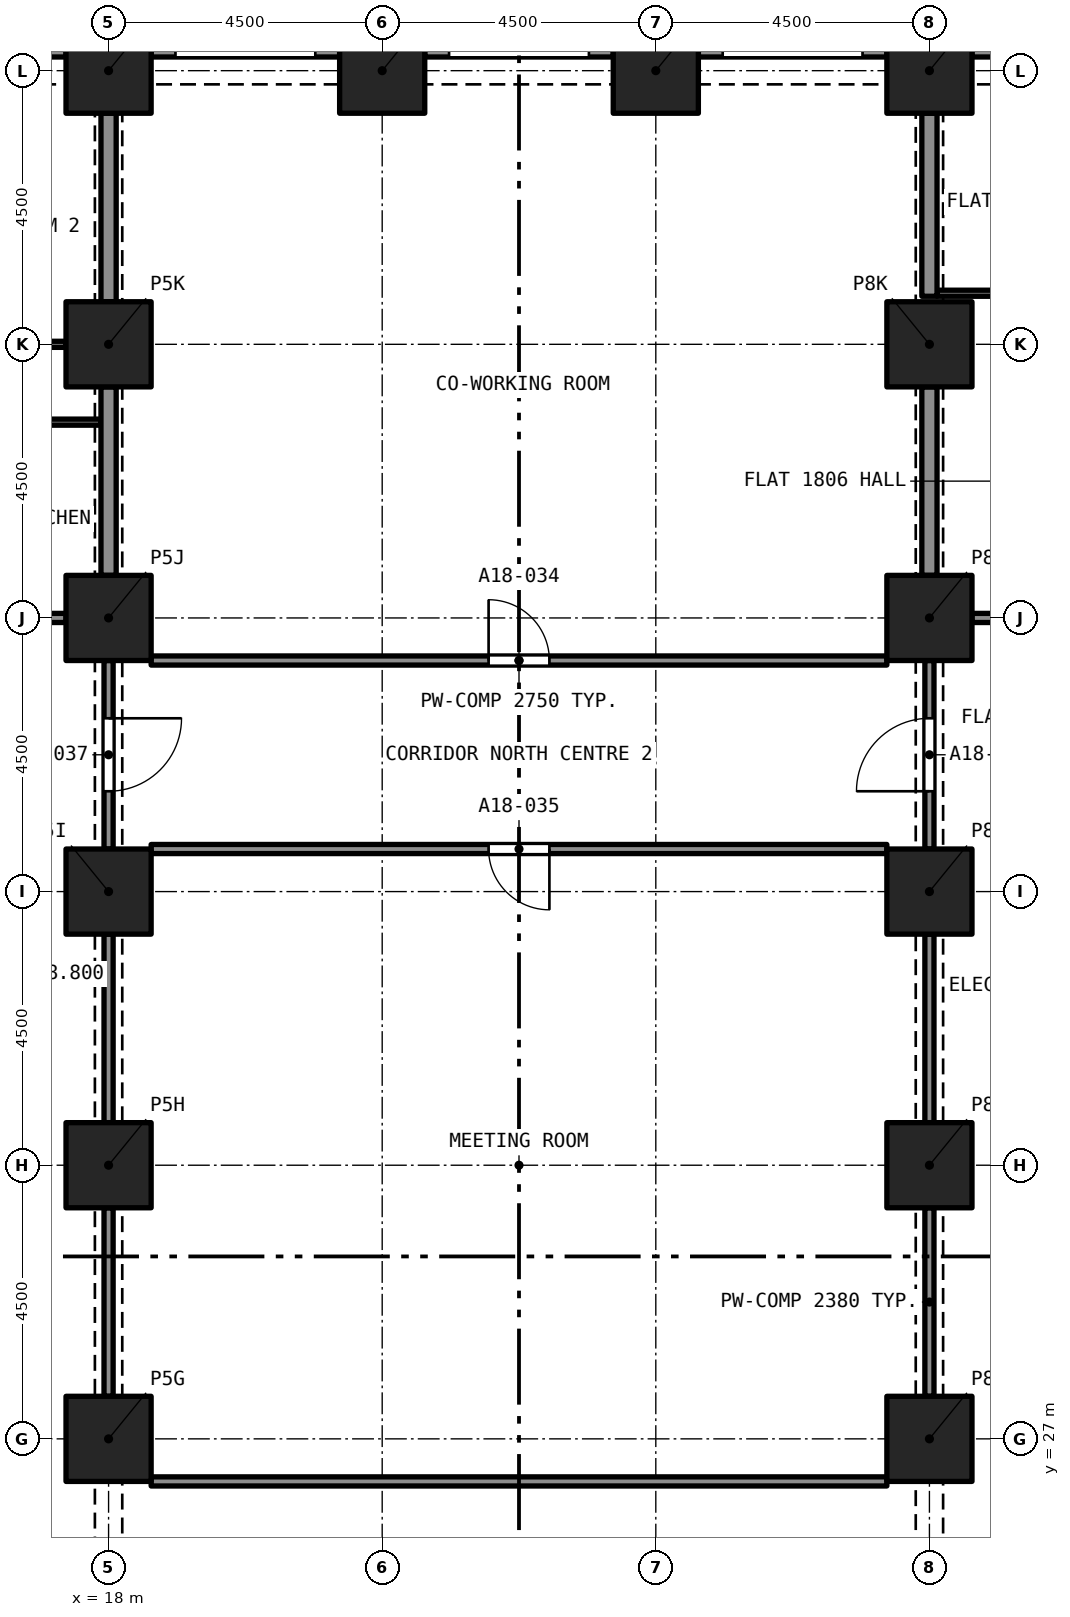
"""IFC4 building model, lengths in metres.
Left out: names, types, materials, properties, quantities, classifications, styles, units other than length and angle.
Written with IfcOpenShell. Run it as: python <this file> out.ifc"""

import sys

from ifc_helpers import new_model, si_unit, direction, frame, frame_2d, origin, origin_2d, place, context, subcontext, project, spatial, rectangle, extrude, element, fill, save


model = new_model("IFC4")
c1 = context("Model", 3, precision=1e-05, world=origin(), true_north=direction((0.0, 1.0)))
c2 = subcontext(c1, "Body", "Model", "MODEL_VIEW")
j1 = project(units=[si_unit("LENGTHUNIT", "METRE"), si_unit("PLANEANGLEUNIT", "RADIAN")], contexts=[c1])
p1 = place(None, origin())
s1 = spatial("IfcSite", under=j1, at=p1, CompositionType="ELEMENT")
p2 = place(p1, origin())
s2 = spatial("IfcBuilding", under=s1, at=p2, CompositionType="ELEMENT")
p3 = place(p2, frame((0.0, 0.0, 68.8)))
s3 = spatial("IfcBuildingStorey", under=s2, at=p3, CompositionType="ELEMENT", Elevation=68.8)
for number, where, z_axis, x_axis in (
    (1, (18.0, 27.0, 0.0), (0.0, 0.0, 1.0), (1.0, 0.0, 0.0)),
    (2, (31.5, 27.0, 0.0), (0.0, 0.0, 1.0), (1.0, 0.0, 0.0)),
    (3, (18.0, 31.5, 0.0), (0.0, 0.0, 1.0), (1.0, 0.0, 0.0)),
    (4, (31.5, 31.5, 0.0), (0.0, 0.0, 1.0), (1.0, 0.0, 0.0)),
    (5, (18.0, 36.0, 0.0), (0.0, 0.0, 1.0), (1.0, 0.0, 0.0)),
    (6, (31.5, 36.0, 0.0), (0.0, 0.0, 1.0), (1.0, 0.0, 0.0)),
    (7, (18.0, 40.5, 0.0), (0.0, 0.0, 1.0), (1.0, 0.0, 0.0)),
    (8, (31.5, 40.5, 0.0), (0.0, 0.0, 1.0), (1.0, 0.0, 0.0)),
    (9, (18.0, 45.0, 0.0), (0.0, 0.0, 1.0), (1.0, 0.0, 0.0)),
    (10, (31.5, 45.0, 0.0), (0.0, 0.0, 1.0), (1.0, 0.0, 0.0)),
    (11, (18.0, 49.5, 0.0), (0.0, 0.0, 1.0), (1.0, 0.0, 0.0)),
    (12, (22.5, 49.5, 0.0), (0.0, 0.0, 1.0), (1.0, 0.0, 0.0)),
    (13, (27.0, 49.5, 0.0), (0.0, 0.0, 1.0), (1.0, 0.0, 0.0)),
    (14, (31.5, 49.5, 0.0), (0.0, 0.0, 1.0), (1.0, 0.0, 0.0)),
):
    element("IfcColumn", number, at=place(p3, frame(where, z_axis=z_axis, x_axis=x_axis)), inside=s3, PredefinedType="COLUMN", context=c2, shape_type="SweptSolid", body=[
        extrude(rectangle(XDim=1.4, YDim=1.4, at=origin_2d()), origin(), (0.0, 0.0, 1.0), 3.2),
    ])
p4 = place(p3, frame((32.2, 49.875, 0.0), z_axis=(0.0, 0.0, 1.0), x_axis=(1.0, 0.0, 0.0)))
e15 = element("IfcWall", 15, at=p4, inside=s3, PredefinedType="SOLIDWALL", context=c2, shape_type="SweptSolid", body=[
    extrude(rectangle(XDim=3.1, YDim=0.3, at=frame_2d((1.55, 0.0))), origin(), (0.0, 0.0, 1.0), 3.2),
])
p5 = place(p4, frame((0.4, 0.0, 0.45)))
e16 = element("IfcOpeningElement", 16, at=p5, cuts=e15, PredefinedType="OPENING", context=c2, shape_type="SweptSolid", body=[
    extrude(rectangle(XDim=2.3, YDim=1.95, at=frame_2d((1.15, 0.975))), frame((0.0, 0.16, 0.0), z_axis=(0.0, -1.0, 0.0), x_axis=(1.0, 0.0, 0.0)), (0.0, 0.0, 1.0), 0.32),
])
p6 = place(p3, frame((27.7, 49.875, 0.0), z_axis=(0.0, 0.0, 1.0), x_axis=(1.0, 0.0, 0.0)))
e17 = element("IfcWall", 17, at=p6, inside=s3, PredefinedType="SOLIDWALL", context=c2, shape_type="SweptSolid", body=[
    extrude(rectangle(XDim=3.1, YDim=0.3, at=frame_2d((1.55, 0.0))), origin(), (0.0, 0.0, 1.0), 3.2),
])
p7 = place(p6, frame((0.4, 0.0, 0.45)))
e18 = element("IfcOpeningElement", 18, at=p7, cuts=e17, PredefinedType="OPENING", context=c2, shape_type="SweptSolid", body=[
    extrude(rectangle(XDim=2.3, YDim=1.95, at=frame_2d((1.15, 0.975))), frame((0.0, 0.16, 0.0), z_axis=(0.0, -1.0, 0.0), x_axis=(1.0, 0.0, 0.0)), (0.0, 0.0, 1.0), 0.32),
])
p8 = place(p3, frame((23.2, 49.875, 0.0), z_axis=(0.0, 0.0, 1.0), x_axis=(1.0, 0.0, 0.0)))
e19 = element("IfcWall", 19, at=p8, inside=s3, PredefinedType="SOLIDWALL", context=c2, shape_type="SweptSolid", body=[
    extrude(rectangle(XDim=3.1, YDim=0.3, at=frame_2d((1.55, 0.0))), origin(), (0.0, 0.0, 1.0), 3.2),
])
p9 = place(p8, frame((0.4, 0.0, 0.45)))
e20 = element("IfcOpeningElement", 20, at=p9, cuts=e19, PredefinedType="OPENING", context=c2, shape_type="SweptSolid", body=[
    extrude(rectangle(XDim=2.3, YDim=1.95, at=frame_2d((1.15, 0.975))), frame((0.0, 0.16, 0.0), z_axis=(0.0, -1.0, 0.0), x_axis=(1.0, 0.0, 0.0)), (0.0, 0.0, 1.0), 0.32),
])
p10 = place(p3, frame((18.7, 49.875, 0.0), z_axis=(0.0, 0.0, 1.0), x_axis=(1.0, 0.0, 0.0)))
e21 = element("IfcWall", 21, at=p10, inside=s3, PredefinedType="SOLIDWALL", context=c2, shape_type="SweptSolid", body=[
    extrude(rectangle(XDim=3.1, YDim=0.3, at=frame_2d((1.55, 0.0))), origin(), (0.0, 0.0, 1.0), 3.2),
])
p11 = place(p10, frame((0.4, 0.0, 0.45)))
e22 = element("IfcOpeningElement", 22, at=p11, cuts=e21, PredefinedType="OPENING", context=c2, shape_type="SweptSolid", body=[
    extrude(rectangle(XDim=2.3, YDim=1.95, at=frame_2d((1.15, 0.975))), frame((0.0, 0.16, 0.0), z_axis=(0.0, -1.0, 0.0), x_axis=(1.0, 0.0, 0.0)), (0.0, 0.0, 1.0), 0.32),
])
p12 = place(p3, frame((14.2, 49.875, 0.0), z_axis=(0.0, 0.0, 1.0), x_axis=(1.0, 0.0, 0.0)))
e23 = element("IfcWall", 23, at=p12, inside=s3, PredefinedType="SOLIDWALL", context=c2, shape_type="SweptSolid", body=[
    extrude(rectangle(XDim=3.1, YDim=0.3, at=frame_2d((1.55, 0.0))), origin(), (0.0, 0.0, 1.0), 3.2),
])
p13 = place(p12, frame((0.4, 0.0, 0.45)))
e24 = element("IfcOpeningElement", 24, at=p13, cuts=e23, PredefinedType="OPENING", context=c2, shape_type="SweptSolid", body=[
    extrude(rectangle(XDim=2.3, YDim=1.95, at=frame_2d((1.15, 0.975))), frame((0.0, 0.16, 0.0), z_axis=(0.0, -1.0, 0.0), x_axis=(1.0, 0.0, 0.0)), (0.0, 0.0, 1.0), 0.32),
])
p14 = place(p3, frame((13.5, 40.5, 0.0), z_axis=(0.0, 0.0, 1.0), x_axis=(1.0, 0.0, 0.0)))
e25 = element("IfcWall", 25, at=p14, inside=s3, PredefinedType="PARTITIONING", context=c2, shape_type="SweptSolid", body=[
    extrude(rectangle(XDim=3.8, YDim=0.15, at=frame_2d((1.9, 0.0))), origin(), (0.0, 0.0, 1.0), 2.9),
])
p15 = place(p3, frame((13.5, 45.0, 0.0), z_axis=(0.0, 0.0, 1.0), x_axis=(1.0, 0.0, 0.0)))
e26 = element("IfcWall", 26, at=p15, inside=s3, PredefinedType="PARTITIONING", context=c2, shape_type="SweptSolid", body=[
    extrude(rectangle(XDim=3.8, YDim=0.1, at=frame_2d((1.9, 0.0))), origin(), (0.0, 0.0, 1.0), 2.9),
])
p16 = place(p15, frame((1.8, 0.0, 0.0)))
e27 = element("IfcOpeningElement", 27, at=p16, cuts=e26, PredefinedType="OPENING", context=c2, shape_type="SweptSolid", body=[
    extrude(rectangle(XDim=0.9, YDim=2.1, at=frame_2d((0.45, 1.05))), frame((0.0, 0.06, 0.0), z_axis=(0.0, -1.0, 0.0), x_axis=(1.0, 0.0, 0.0)), (0.0, 0.0, 1.0), 0.12),
])
p17 = place(p3, frame((18.0, 45.7, 0.0), z_axis=(0.0, 0.0, 1.0), x_axis=(0.0, 1.0, 0.0)))
e28 = element("IfcWall", 28, at=p17, inside=s3, PredefinedType="PARTITIONING", context=c2, shape_type="SweptSolid", body=[
    extrude(rectangle(XDim=3.1, YDim=0.25, at=frame_2d((1.55, 0.0))), origin(), (0.0, 0.0, 1.0), 2.38),
])
p18 = place(p3, frame((17.875, 43.72, 0.0), z_axis=(0.0, 0.0, 1.0), x_axis=(-1.0, 0.0, 0.0)))
e29 = element("IfcWall", 29, at=p18, inside=s3, PredefinedType="PARTITIONING", context=c2, shape_type="SweptSolid", body=[
    extrude(rectangle(XDim=3.58, YDim=0.1, at=frame_2d((1.79, 0.0))), origin(), (0.0, 0.0, 1.0), 2.9),
])
p19 = place(p18, frame((1.277, 0.0, 0.0)))
e30 = element("IfcOpeningElement", 30, at=p19, cuts=e29, PredefinedType="OPENING", context=c2, shape_type="SweptSolid", body=[
    extrude(rectangle(XDim=0.9, YDim=2.1, at=frame_2d((0.45, 1.05))), frame((0.0, 0.06, 0.0), z_axis=(0.0, -1.0, 0.0), x_axis=(1.0, 0.0, 0.0)), (0.0, 0.0, 1.0), 0.12),
])
p20 = place(p3, frame((18.0, 41.2, 0.0), z_axis=(0.0, 0.0, 1.0), x_axis=(0.0, 1.0, 0.0)))
e31 = element("IfcWall", 31, at=p20, inside=s3, PredefinedType="PARTITIONING", context=c2, shape_type="SweptSolid", body=[
    extrude(rectangle(XDim=3.1, YDim=0.25, at=frame_2d((1.55, 0.0))), origin(), (0.0, 0.0, 1.0), 2.38),
])
p21 = place(p3, frame((31.625, 45.84, 0.0), z_axis=(0.0, 0.0, 1.0), x_axis=(1.0, 0.0, 0.0)))
e32 = element("IfcWall", 32, at=p21, inside=s3, PredefinedType="PARTITIONING", context=c2, shape_type="SweptSolid", body=[
    extrude(rectangle(XDim=4.375, YDim=0.1, at=frame_2d((2.188, 0.0))), origin(), (0.0, 0.0, 1.0), 2.9),
])
p22 = place(p21, frame((1.625, 0.0, 0.0)))
e33 = element("IfcOpeningElement", 33, at=p22, cuts=e32, PredefinedType="OPENING", context=c2, shape_type="SweptSolid", body=[
    extrude(rectangle(XDim=1.0, YDim=2.1, at=frame_2d((0.5, 1.05))), frame((0.0, 0.06, 0.0), z_axis=(0.0, -1.0, 0.0), x_axis=(1.0, 0.0, 0.0)), (0.0, 0.0, 1.0), 0.12),
])
p23 = place(p3, frame((31.5, 41.2, 0.0), z_axis=(0.0, 0.0, 1.0), x_axis=(0.0, 1.0, 0.0)))
e34 = element("IfcWall", 34, at=p23, inside=s3, PredefinedType="PARTITIONING", context=c2, shape_type="SweptSolid", body=[
    extrude(rectangle(XDim=3.1, YDim=0.25, at=frame_2d((1.55, 0.0))), origin(), (0.0, 0.0, 1.0), 2.38),
])
p24 = place(p3, frame((32.2, 40.5, 0.0), z_axis=(0.0, 0.0, 1.0), x_axis=(1.0, 0.0, 0.0)))
e35 = element("IfcWall", 35, at=p24, inside=s3, PredefinedType="PARTITIONING", context=c2, shape_type="SweptSolid", body=[
    extrude(rectangle(XDim=2.3, YDim=0.15, at=frame_2d((1.15, 0.0))), origin(), (0.0, 0.0, 1.0), 2.9),
])
p25 = place(p24, frame((1.05, 0.0, 0.0)))
e36 = element("IfcOpeningElement", 36, at=p25, cuts=e35, PredefinedType="OPENING", context=c2, shape_type="SweptSolid", body=[
    extrude(rectangle(XDim=1.0, YDim=2.1, at=frame_2d((0.5, 1.05))), frame((0.0, 0.085, 0.0), z_axis=(0.0, -1.0, 0.0), x_axis=(1.0, 0.0, 0.0)), (0.0, 0.0, 1.0), 0.17),
])
p26 = place(p3, frame((31.5, 45.79, 0.0), z_axis=(0.0, 0.0, 1.0), x_axis=(0.0, 1.0, 0.0)))
e37 = element("IfcWall", 37, at=p26, inside=s3, PredefinedType="PARTITIONING", context=c2, shape_type="SweptSolid", body=[
    extrude(rectangle(XDim=3.01, YDim=0.25, at=frame_2d((1.505, 0.0))), origin(), (0.0, 0.0, 1.0), 2.38),
])
p27 = place(p3, frame((18.7, 39.8, 0.0), z_axis=(0.0, 0.0, 1.0), x_axis=(1.0, 0.0, 0.0)))
e38 = element("IfcWall", 38, at=p27, inside=s3, PredefinedType="PARTITIONING", context=c2, shape_type="SweptSolid", body=[
    extrude(rectangle(XDim=12.1, YDim=0.15, at=frame_2d((6.05, 0.0))), origin(), (0.0, 0.0, 1.0), 2.75),
])
p28 = place(p27, frame((5.55, 0.0, 0.0)))
e39 = element("IfcOpeningElement", 39, at=p28, cuts=e38, PredefinedType="OPENING", context=c2, shape_type="SweptSolid", body=[
    extrude(rectangle(XDim=1.0, YDim=2.1, at=frame_2d((0.5, 1.05))), frame((0.0, 0.085, 0.0), z_axis=(0.0, -1.0, 0.0), x_axis=(1.0, 0.0, 0.0)), (0.0, 0.0, 1.0), 0.17),
])
p29 = place(p3, frame((30.8, 36.7, 0.0), z_axis=(0.0, 0.0, 1.0), x_axis=(-1.0, 0.0, 0.0)))
e40 = element("IfcWall", 40, at=p29, inside=s3, PredefinedType="PARTITIONING", context=c2, shape_type="SweptSolid", body=[
    extrude(rectangle(XDim=12.1, YDim=0.15, at=frame_2d((6.05, 0.0))), origin(), (0.0, 0.0, 1.0), 2.75),
])
p30 = place(p29, frame((5.55, 0.0, 0.0)))
e41 = element("IfcOpeningElement", 41, at=p30, cuts=e40, PredefinedType="OPENING", context=c2, shape_type="SweptSolid", body=[
    extrude(rectangle(XDim=1.0, YDim=2.1, at=frame_2d((0.5, 1.05))), frame((0.0, 0.085, 0.0), z_axis=(0.0, -1.0, 0.0), x_axis=(1.0, 0.0, 0.0)), (0.0, 0.0, 1.0), 0.17),
])
p31 = place(p3, frame((31.5, 36.7, 0.0), z_axis=(0.0, 0.0, 1.0), x_axis=(0.0, 1.0, 0.0)))
e42 = element("IfcWall", 42, at=p31, inside=s3, PredefinedType="PARTITIONING", context=c2, shape_type="SweptSolid", body=[
    extrude(rectangle(XDim=3.1, YDim=0.15, at=frame_2d((1.55, 0.0))), origin(), (0.0, 0.0, 1.0), 2.38),
])
p32 = place(p31, frame((0.95, 0.0, 0.0)))
e43 = element("IfcOpeningElement", 43, at=p32, cuts=e42, PredefinedType="OPENING", context=c2, shape_type="SweptSolid", body=[
    extrude(rectangle(XDim=1.2, YDim=2.1, at=frame_2d((0.6, 1.05))), frame((0.0, 0.085, 0.0), z_axis=(0.0, -1.0, 0.0), x_axis=(1.0, 0.0, 0.0)), (0.0, 0.0, 1.0), 0.17),
])
p33 = place(p3, frame((18.0, 39.8, 0.0), z_axis=(0.0, 0.0, 1.0), x_axis=(0.0, -1.0, 0.0)))
e44 = element("IfcWall", 44, at=p33, inside=s3, PredefinedType="PARTITIONING", context=c2, shape_type="SweptSolid", body=[
    extrude(rectangle(XDim=3.1, YDim=0.15, at=frame_2d((1.55, 0.0))), origin(), (0.0, 0.0, 1.0), 2.38),
])
p34 = place(p33, frame((0.95, 0.0, 0.0)))
e45 = element("IfcOpeningElement", 45, at=p34, cuts=e44, PredefinedType="OPENING", context=c2, shape_type="SweptSolid", body=[
    extrude(rectangle(XDim=1.2, YDim=2.1, at=frame_2d((0.6, 1.05))), frame((0.0, 0.085, 0.0), z_axis=(0.0, -1.0, 0.0), x_axis=(1.0, 0.0, 0.0)), (0.0, 0.0, 1.0), 0.17),
])
for number, where, z_axis, x_axis in (
    (46, (31.5, 32.2, 0.0), (0.0, 0.0, 1.0), (0.0, 1.0, 0.0)),
    (47, (31.5, 27.7, 0.0), (0.0, 0.0, 1.0), (0.0, 1.0, 0.0)),
    (48, (18.0, 27.7, 0.0), (0.0, 0.0, 1.0), (0.0, 1.0, 0.0)),
    (49, (18.0, 32.2, 0.0), (0.0, 0.0, 1.0), (0.0, 1.0, 0.0)),
):
    element("IfcWall", number, at=place(p3, frame(where, z_axis=z_axis, x_axis=x_axis)), inside=s3, PredefinedType="PARTITIONING", context=c2, shape_type="SweptSolid", body=[
        extrude(rectangle(XDim=3.1, YDim=0.15, at=frame_2d((1.55, 0.0))), origin(), (0.0, 0.0, 1.0), 2.38),
    ])
p35 = place(p3, frame((18.7, 26.3, 0.0), z_axis=(0.0, 0.0, 1.0), x_axis=(1.0, 0.0, 0.0)))
e50 = element("IfcWall", 50, at=p35, inside=s3, PredefinedType="PARTITIONING", context=c2, shape_type="SweptSolid", body=[
    extrude(rectangle(XDim=12.1, YDim=0.15, at=frame_2d((6.05, 0.0))), origin(), (0.0, 0.0, 1.0), 2.75),
])
p36 = place(p28, origin())
e51 = element("IfcDoor", 51, at=p36, inside=s3, OperationType="SINGLE_SWING_RIGHT", PredefinedType="DOOR", context=c2, shape_type="SweptSolid", body=[
    extrude(rectangle(XDim=1.0, YDim=2.1, at=frame_2d((0.5, 1.05))), frame((0.0, 0.025, 0.0), z_axis=(0.0, -1.0, 0.0), x_axis=(1.0, 0.0, 0.0)), (0.0, 0.0, 1.0), 0.05),
])
fill(e39, e51)
p37 = place(p30, origin())
e52 = element("IfcDoor", 52, at=p37, inside=s3, OperationType="SINGLE_SWING_RIGHT", PredefinedType="DOOR", context=c2, shape_type="SweptSolid", body=[
    extrude(rectangle(XDim=1.0, YDim=2.1, at=frame_2d((0.5, 1.05))), frame((0.0, 0.025, 0.0), z_axis=(0.0, -1.0, 0.0), x_axis=(1.0, 0.0, 0.0)), (0.0, 0.0, 1.0), 0.05),
])
fill(e41, e52)
p38 = place(p32, origin())
e53 = element("IfcDoor", 53, at=p38, inside=s3, OperationType="SINGLE_SWING_LEFT", PredefinedType="DOOR", context=c2, shape_type="SweptSolid", body=[
    extrude(rectangle(XDim=1.2, YDim=2.1, at=frame_2d((0.6, 1.05))), frame((0.0, 0.025, 0.0), z_axis=(0.0, -1.0, 0.0), x_axis=(1.0, 0.0, 0.0)), (0.0, 0.0, 1.0), 0.05),
])
fill(e43, e53)
p39 = place(p34, origin())
e54 = element("IfcDoor", 54, at=p39, inside=s3, OperationType="SINGLE_SWING_LEFT", PredefinedType="DOOR", context=c2, shape_type="SweptSolid", body=[
    extrude(rectangle(XDim=1.2, YDim=2.1, at=frame_2d((0.6, 1.05))), frame((0.0, 0.025, 0.0), z_axis=(0.0, -1.0, 0.0), x_axis=(1.0, 0.0, 0.0)), (0.0, 0.0, 1.0), 0.05),
])
fill(e45, e54)
save(model, sys.argv[1])
